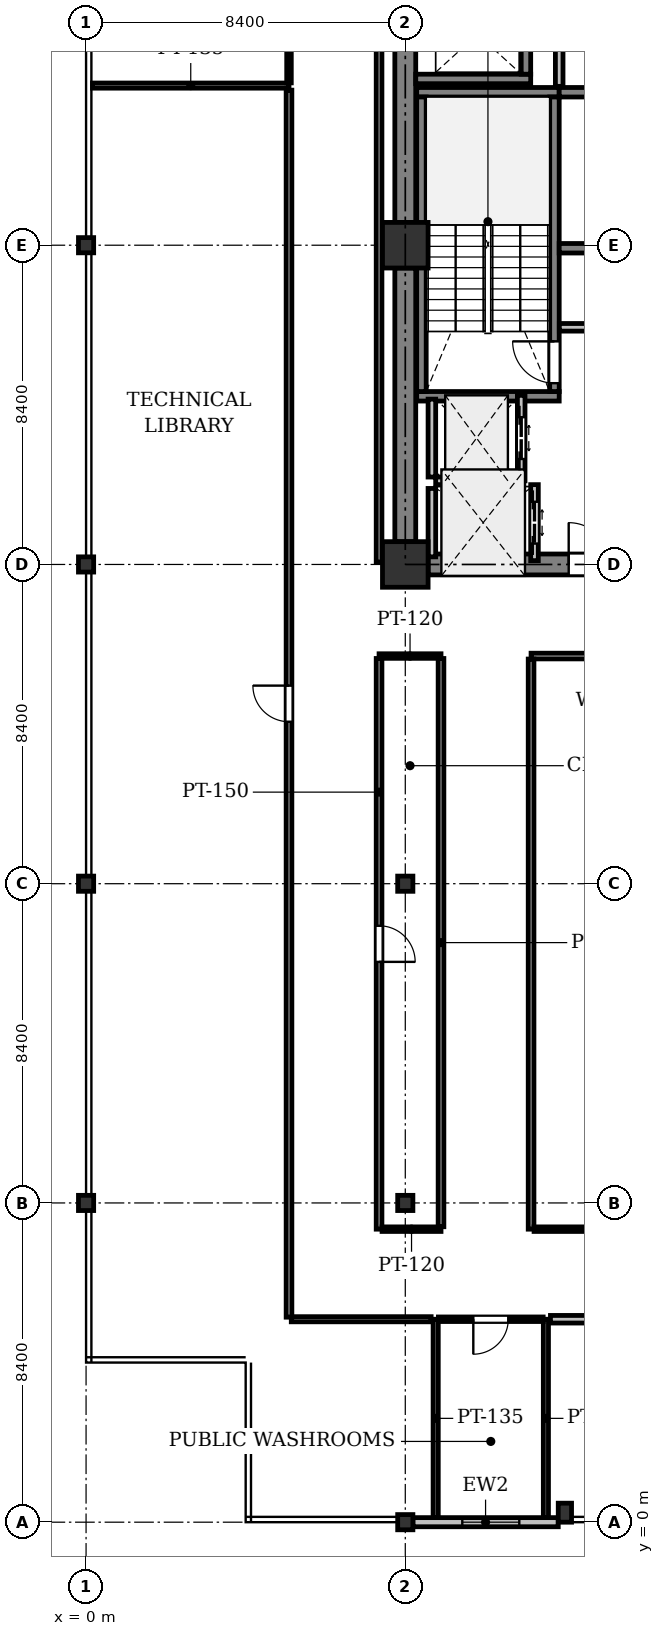
"""IFC4 building model, lengths in metres.
Left out: names, types, materials, properties, quantities, classifications, styles, units other than length and angle.
Written with IfcOpenShell. Run it as: python <this file> out.ifc"""

import sys

from ifc_helpers import new_model, si_unit, direction, frame, frame_2d, origin, origin_2d, place, context, subcontext, project, spatial, rectangle, i_section, extrude, element, fill, save


model = new_model("IFC4")
c1 = context("Model", 3, precision=1e-05, world=origin(), true_north=direction((0.0, 1.0)))
c2 = subcontext(c1, "Body", "Model", "MODEL_VIEW")
j1 = project(units=[si_unit("LENGTHUNIT", "METRE"), si_unit("PLANEANGLEUNIT", "RADIAN")], contexts=[c1])
p1 = place(None, origin())
s1 = spatial("IfcSite", under=j1, at=p1, CompositionType="ELEMENT")
p2 = place(p1, origin())
s2 = spatial("IfcBuilding", under=s1, at=p2, CompositionType="ELEMENT")
p3 = place(p2, frame((0.0, 0.0, 154.1)))
s3 = spatial("IfcBuildingStorey", under=s2, at=p3, CompositionType="ELEMENT", Elevation=154.1)
for number, where, z_axis, x_axis in (
    (1, (0.0, 8.4, 0.0), (0.0, 0.0, 1.0), (1.0, 0.0, 0.0)),
    (2, (0.0, 16.8, 0.0), (0.0, 0.0, 1.0), (1.0, 0.0, 0.0)),
    (3, (0.0, 25.2, 0.0), (0.0, 0.0, 1.0), (1.0, 0.0, 0.0)),
    (4, (0.0, 33.6, 0.0), (0.0, 0.0, 1.0), (1.0, 0.0, 0.0)),
    (5, (8.4, 0.0, 0.0), (0.0, 0.0, 1.0), (1.0, 0.0, 0.0)),
    (6, (8.4, 8.4, 0.0), (0.0, 0.0, 1.0), (1.0, 0.0, 0.0)),
    (7, (8.4, 16.8, 0.0), (0.0, 0.0, 1.0), (1.0, 0.0, 0.0)),
):
    element("IfcColumn", number, at=place(p3, frame(where, z_axis=z_axis, x_axis=x_axis)), inside=s3, PredefinedType="COLUMN", context=c2, shape_type="SweptSolid", body=[
        extrude(i_section(OverallWidth=0.4, OverallDepth=0.4, WebThickness=0.025, FlangeThickness=0.04, at=origin_2d()), origin(), (0.0, 0.0, 1.0), 4.1),
    ])
for number, where, z_axis, x_axis in (
    (8, (8.4, 25.2, 0.0), (0.0, 0.0, 1.0), (1.0, 0.0, 0.0)),
    (9, (8.4, 33.6, 0.0), (0.0, 0.0, 1.0), (1.0, 0.0, 0.0)),
):
    element("IfcColumn", number, at=place(p3, frame(where, z_axis=z_axis, x_axis=x_axis)), inside=s3, PredefinedType="COLUMN", context=c2, shape_type="SweptSolid", body=[
        extrude(rectangle(XDim=1.2, YDim=1.2, at=origin_2d()), origin(), (0.0, 0.0, 1.0), 4.1),
    ])
p4 = place(p3, frame((12.6, 0.25, 0.0), z_axis=(0.0, 0.0, 1.0), x_axis=(1.0, 0.0, 0.0)))
e10 = element("IfcColumn", 10, at=p4, inside=s3, PredefinedType="PILASTER", context=c2, shape_type="SweptSolid", body=[
    extrude(rectangle(XDim=0.35, YDim=0.5, at=origin_2d()), origin(), (0.0, 0.0, 1.0), 4.1),
])
p5 = place(p3, frame((12.425, 0.0, 0.0), z_axis=(0.0, 0.0, 1.0), x_axis=(-1.0, 0.0, 0.0)))
e11 = element("IfcWall", 11, at=p5, inside=s3, PredefinedType="STANDARD", context=c2, shape_type="SweptSolid", body=[
    extrude(rectangle(XDim=3.825, YDim=0.24, at=frame_2d((1.913, 0.0))), origin(), (0.0, 0.0, 1.0), 3.422),
])
p6 = place(p5, frame((1.025, 0.0, 0.9)))
e12 = element("IfcOpeningElement", 12, at=p6, cuts=e11, PredefinedType="OPENING", context=c2, shape_type="SweptSolid", body=[
    extrude(rectangle(XDim=1.5, YDim=1.6, at=frame_2d((0.75, 0.8))), frame((0.0, 0.13, 0.0), z_axis=(0.0, -1.0, 0.0), x_axis=(1.0, 0.0, 0.0)), (0.0, 0.0, 1.0), 0.26),
])
for number, where, z_axis, x_axis in (
    (13, (8.4, 25.8, 0.0), (0.0, 0.0, 1.0), (0.0, 1.0, 0.0)),
    (14, (8.4, 34.2, 0.0), (0.0, 0.0, 1.0), (0.0, 1.0, 0.0)),
):
    element("IfcWall", number, at=place(p3, frame(where, z_axis=z_axis, x_axis=x_axis)), inside=s3, PredefinedType="SHEAR", context=c2, shape_type="SweptSolid", body=[
        extrude(rectangle(XDim=7.2, YDim=0.55, at=frame_2d((3.6, 0.0))), origin(), (0.0, 0.0, 1.0), 3.825),
    ])
p7 = place(p3, frame((9.0, 25.2, 0.0), z_axis=(0.0, 0.0, 1.0), x_axis=(1.0, 0.0, 0.0)))
e15 = element("IfcWall", 15, at=p7, inside=s3, PredefinedType="SHEAR", context=c2, shape_type="SweptSolid", body=[
    extrude(rectangle(XDim=7.2, YDim=0.55, at=frame_2d((3.6, 0.0))), origin(), (0.0, 0.0, 1.0), 3.825),
])
p8 = place(p7, frame((3.7, 0.0, 0.0)))
e16 = element("IfcOpeningElement", 16, at=p8, cuts=e15, PredefinedType="OPENING", context=c2, shape_type="SweptSolid", body=[
    extrude(rectangle(XDim=1.1, YDim=2.15, at=frame_2d((0.55, 1.075))), frame((0.0, 0.285, 0.0), z_axis=(0.0, -1.0, 0.0), x_axis=(1.0, 0.0, 0.0)), (0.0, 0.0, 1.0), 0.57),
])
for number, where, z_axis, x_axis in (
    (17, (12.45, 29.625, 0.0), (0.0, 0.0, 1.0), (-1.0, 0.0, 0.0)),
    (18, (12.45, 37.625, 0.0), (0.0, 0.0, 1.0), (-1.0, 0.0, 0.0)),
):
    element("IfcWall", number, at=place(p3, frame(where, z_axis=z_axis, x_axis=x_axis)), inside=s3, PredefinedType="SHEAR", context=c2, shape_type="SweptSolid", body=[
        extrude(rectangle(XDim=3.75, YDim=0.25, at=frame_2d((1.875, 0.0))), origin(), (0.0, 0.0, 1.0), 3.825),
    ])
p9 = place(p3, frame((12.325, 29.75, 0.0), z_axis=(0.0, 0.0, 1.0), x_axis=(0.0, 1.0, 0.0)))
e19 = element("IfcWall", 19, at=p9, inside=s3, PredefinedType="SHEAR", context=c2, shape_type="SweptSolid", body=[
    extrude(rectangle(XDim=7.75, YDim=0.25, at=frame_2d((3.875, 0.0))), origin(), (0.0, 0.0, 1.0), 3.825),
])
p10 = place(p9, frame((0.22, 0.0, 0.0)))
e20 = element("IfcOpeningElement", 20, at=p10, cuts=e19, PredefinedType="OPENING", context=c2, shape_type="SweptSolid", body=[
    extrude(rectangle(XDim=1.1, YDim=2.15, at=frame_2d((0.55, 1.075))), frame((0.0, 0.135, 0.0), z_axis=(0.0, -1.0, 0.0), x_axis=(1.0, 0.0, 0.0)), (0.0, 0.0, 1.0), 0.27),
])
p11 = place(p3, frame((8.825, 29.75, 0.0), z_axis=(0.0, 0.0, 1.0), x_axis=(0.0, 1.0, 0.0)))
e21 = element("IfcWall", 21, at=p11, inside=s3, PredefinedType="SHEAR", context=c2, shape_type="SweptSolid", body=[
    extrude(rectangle(XDim=7.75, YDim=0.25, at=frame_2d((3.875, 0.0))), origin(), (0.0, 0.0, 1.0), 3.825),
])
p12 = place(p3, frame((8.675, 37.975, 0.0), z_axis=(0.0, 0.0, 1.0), x_axis=(1.0, 0.0, 0.0)))
e22 = element("IfcWall", 22, at=p12, inside=s3, PredefinedType="SHEAR", context=c2, shape_type="SweptSolid", body=[
    extrude(rectangle(XDim=3.025, YDim=0.25, at=frame_2d((1.512, 0.0))), origin(), (0.0, 0.0, 1.0), 3.825),
])
p13 = place(p3, frame((11.575, 38.1, 0.0), z_axis=(0.0, 0.0, 1.0), x_axis=(0.0, 1.0, 0.0)))
e23 = element("IfcWall", 23, at=p13, inside=s3, PredefinedType="SHEAR", context=c2, shape_type="SweptSolid", body=[
    extrude(rectangle(XDim=2.55, YDim=0.25, at=frame_2d((1.275, 0.0))), origin(), (0.0, 0.0, 1.0), 3.825),
])
p14 = place(p3, frame((12.45, 33.52, 0.0), z_axis=(0.0, 0.0, 1.0), x_axis=(1.0, 0.0, 0.0)))
e24 = element("IfcWall", 24, at=p14, inside=s3, PredefinedType="SHEAR", context=c2, shape_type="SweptSolid", body=[
    extrude(rectangle(XDim=3.75, YDim=0.25, at=frame_2d((1.875, 0.0))), origin(), (0.0, 0.0, 1.0), 3.825),
])
p15 = place(p14, frame((2.15, 0.0, 0.0)))
e25 = element("IfcOpeningElement", 25, at=p15, cuts=e24, PredefinedType="OPENING", context=c2, shape_type="SweptSolid", body=[
    extrude(rectangle(XDim=1.0, YDim=2.15, at=frame_2d((0.5, 1.075))), frame((0.0, 0.135, 0.0), z_axis=(0.0, -1.0, 0.0), x_axis=(1.0, 0.0, 0.0)), (0.0, 0.0, 1.0), 0.27),
])
p16 = place(p3, frame((12.45, 37.625, 0.0), z_axis=(0.0, 0.0, 1.0), x_axis=(1.0, 0.0, 0.0)))
e26 = element("IfcWall", 26, at=p16, inside=s3, PredefinedType="SHEAR", context=c2, shape_type="SweptSolid", body=[
    extrude(rectangle(XDim=4.075, YDim=0.25, at=frame_2d((2.038, 0.0))), origin(), (0.0, 0.0, 1.0), 3.825),
])
p17 = place(p16, frame((1.613, 0.0, 0.0)))
e27 = element("IfcOpeningElement", 27, at=p17, cuts=e26, PredefinedType="OPENING", context=c2, shape_type="SweptSolid", body=[
    extrude(rectangle(XDim=0.85, YDim=2.15, at=frame_2d((0.425, 1.075))), frame((0.0, 0.135, 0.0), z_axis=(0.0, -1.0, 0.0), x_axis=(1.0, 0.0, 0.0)), (0.0, 0.0, 1.0), 0.27),
])
p18 = place(p3, frame((11.45, 27.4, 0.0), z_axis=(0.0, 0.0, 1.0), x_axis=(0.0, 1.0, 0.0)))
e28 = element("IfcWall", 28, at=p18, inside=s3, PredefinedType="PARTITIONING", context=c2, shape_type="SweptSolid", body=[
    extrude(rectangle(XDim=2.25, YDim=0.2, at=frame_2d((1.125, 0.0))), origin(), (0.0, 0.0, 1.0), 3.825),
])
p19 = place(p18, frame((0.575, 0.0, 0.0)))
e29 = element("IfcOpeningElement", 29, at=p19, cuts=e28, PredefinedType="OPENING", context=c2, shape_type="SweptSolid", body=[
    extrude(rectangle(XDim=1.1, YDim=2.2, at=frame_2d((0.55, 1.1))), frame((0.0, 0.11, 0.0), z_axis=(0.0, -1.0, 0.0), x_axis=(1.0, 0.0, 0.0)), (0.0, 0.0, 1.0), 0.22),
])
p20 = place(p3, frame((9.1, 27.5, 0.0), z_axis=(0.0, 0.0, 1.0), x_axis=(0.0, 1.0, 0.0)))
e30 = element("IfcWall", 30, at=p20, inside=s3, PredefinedType="PARTITIONING", context=c2, shape_type="SweptSolid", body=[
    extrude(rectangle(XDim=2.05, YDim=0.2, at=frame_2d((1.025, 0.0))), origin(), (0.0, 0.0, 1.0), 3.825),
])
p21 = place(p3, frame((9.2, 27.4, 0.0), z_axis=(0.0, 0.0, 1.0), x_axis=(1.0, 0.0, 0.0)))
e31 = element("IfcWall", 31, at=p21, inside=s3, PredefinedType="PARTITIONING", context=c2, shape_type="SweptSolid", body=[
    extrude(rectangle(XDim=2.15, YDim=0.2, at=frame_2d((1.075, 0.0))), origin(), (0.0, 0.0, 1.0), 3.825),
])
p22 = place(p3, frame((11.8, 25.3, 0.0), z_axis=(0.0, 0.0, 1.0), x_axis=(0.0, 1.0, 0.0)))
e32 = element("IfcWall", 32, at=p22, inside=s3, PredefinedType="PARTITIONING", context=c2, shape_type="SweptSolid", body=[
    extrude(rectangle(XDim=2.0, YDim=0.2, at=frame_2d((1.0, 0.0))), origin(), (0.0, 0.0, 1.0), 3.825),
])
p23 = place(p22, frame((0.45, 0.0, 0.0)))
e33 = element("IfcOpeningElement", 33, at=p23, cuts=e32, PredefinedType="OPENING", context=c2, shape_type="SweptSolid", body=[
    extrude(rectangle(XDim=1.1, YDim=2.2, at=frame_2d((0.55, 1.1))), frame((0.0, 0.11, 0.0), z_axis=(0.0, -1.0, 0.0), x_axis=(1.0, 0.0, 0.0)), (0.0, 0.0, 1.0), 0.22),
])
p24 = place(p3, frame((9.1, 25.4, 0.0), z_axis=(0.0, 0.0, 1.0), x_axis=(0.0, 1.0, 0.0)))
e34 = element("IfcWall", 34, at=p24, inside=s3, PredefinedType="PARTITIONING", context=c2, shape_type="SweptSolid", body=[
    extrude(rectangle(XDim=1.8, YDim=0.2, at=frame_2d((0.9, 0.0))), origin(), (0.0, 0.0, 1.0), 3.825),
])
p25 = place(p3, frame((12.454, 31.44, 0.0), z_axis=(0.0, 0.0, 1.0), x_axis=(1.0, 0.0, 0.0)))
e35 = element("IfcWall", 35, at=p25, inside=s3, PredefinedType="PARTITIONING", context=c2, shape_type="SweptSolid", body=[
    extrude(rectangle(XDim=1.666, YDim=0.2, at=frame_2d((0.833, 0.0))), origin(), (0.0, 0.0, 1.0), 3.825),
])
p26 = place(p3, frame((12.45, 40.646, 0.0), z_axis=(0.0, 0.0, 1.0), x_axis=(0.0, -1.0, 0.0)))
e36 = element("IfcWall", 36, at=p26, inside=s3, PredefinedType="PARTITIONING", context=c2, shape_type="SweptSolid", body=[
    extrude(rectangle(XDim=2.866, YDim=0.2, at=frame_2d((1.433, 0.0))), origin(), (0.0, 0.0, 1.0), 2.725),
])
p27 = place(p3, frame((0.169, 37.8, 0.0), z_axis=(0.0, 0.0, 1.0), x_axis=(1.0, 0.0, 0.0)))
e37 = element("IfcWall", 37, at=p27, inside=s3, PredefinedType="PARTITIONING", context=c2, shape_type="SweptSolid", body=[
    extrude(rectangle(XDim=5.171, YDim=0.135, at=frame_2d((2.585, 0.0))), origin(), (0.0, 0.0, 1.0), 3.469),
])
p28 = place(p3, frame((5.34, 37.872, 0.0), z_axis=(0.0, 0.0, 1.0), x_axis=(0.0, 1.0, 0.0)))
e38 = element("IfcWall", 38, at=p28, inside=s3, PredefinedType="PARTITIONING", context=c2, shape_type="SweptSolid", body=[
    extrude(rectangle(XDim=2.907, YDim=0.12, at=frame_2d((1.454, 0.0))), origin(), (0.0, 0.0, 1.0), 3.825),
])
p29 = place(p28, frame((0.993, 0.0, 0.0)))
e39 = element("IfcOpeningElement", 39, at=p29, cuts=e38, PredefinedType="OPENING", context=c2, shape_type="SweptSolid", body=[
    extrude(rectangle(XDim=0.92, YDim=2.1, at=frame_2d((0.46, 1.05))), frame((0.0, 0.07, 0.0), z_axis=(0.0, -1.0, 0.0), x_axis=(1.0, 0.0, 0.0)), (0.0, 0.0, 1.0), 0.14),
])
for number, where, z_axis, x_axis in (
    (40, (9.2, 5.34, 0.0), (0.0, 0.0, 1.0), (0.0, -1.0, 0.0)),
    (41, (12.1, 0.124, 0.0), (0.0, 0.0, 1.0), (0.0, 1.0, 0.0)),
):
    element("IfcWall", number, at=place(p3, frame(where, z_axis=z_axis, x_axis=x_axis)), inside=s3, PredefinedType="PARTITIONING", context=c2, shape_type="SweptSolid", body=[
        extrude(rectangle(XDim=5.216, YDim=0.135, at=frame_2d((2.608, 0.0))), origin(), (0.0, 0.0, 1.0), 3.825),
    ])
p30 = place(p3, frame((12.029, 5.34, 0.0), z_axis=(0.0, 0.0, 1.0), x_axis=(-1.0, 0.0, 0.0)))
e42 = element("IfcWall", 42, at=p30, inside=s3, PredefinedType="PARTITIONING", context=c2, shape_type="SweptSolid", body=[
    extrude(rectangle(XDim=2.757, YDim=0.12, at=frame_2d((1.378, 0.0))), origin(), (0.0, 0.0, 1.0), 3.825),
])
p31 = place(p30, frame((0.918, 0.0, 0.0)))
e43 = element("IfcOpeningElement", 43, at=p31, cuts=e42, PredefinedType="OPENING", context=c2, shape_type="SweptSolid", body=[
    extrude(rectangle(XDim=0.92, YDim=2.1, at=frame_2d((0.46, 1.05))), frame((0.0, 0.07, 0.0), z_axis=(0.0, -1.0, 0.0), x_axis=(1.0, 0.0, 0.0)), (0.0, 0.0, 1.0), 0.14),
])
p32 = place(p3, frame((9.34, 22.79, 0.0), z_axis=(0.0, 0.0, 1.0), x_axis=(-1.0, 0.0, 0.0)))
e44 = element("IfcWall", 44, at=p32, inside=s3, PredefinedType="PARTITIONING", context=c2, shape_type="SweptSolid", body=[
    extrude(rectangle(XDim=1.63, YDim=0.12, at=frame_2d((0.815, 0.0))), origin(), (0.0, 0.0, 1.0), 3.297),
])
p33 = place(p3, frame((7.71, 22.726, 0.0), z_axis=(0.0, 0.0, 1.0), x_axis=(0.0, -1.0, 0.0)))
e45 = element("IfcWall", 45, at=p33, inside=s3, PredefinedType="PARTITIONING", context=c2, shape_type="SweptSolid", body=[
    extrude(rectangle(XDim=15.016, YDim=0.15, at=frame_2d((7.508, 0.0))), origin(), (0.0, 0.0, 1.0), 3.292),
])
p34 = place(p33, frame((7.033, 0.0, 0.0)))
e46 = element("IfcOpeningElement", 46, at=p34, cuts=e45, PredefinedType="OPENING", context=c2, shape_type="SweptSolid", body=[
    extrude(rectangle(XDim=0.95, YDim=2.15, at=frame_2d((0.475, 1.075))), frame((0.0, 0.085, 0.0), z_axis=(0.0, -1.0, 0.0), x_axis=(1.0, 0.0, 0.0)), (0.0, 0.0, 1.0), 0.17),
])
p35 = place(p3, frame((7.789, 7.71, 0.0), z_axis=(0.0, 0.0, 1.0), x_axis=(1.0, 0.0, 0.0)))
e47 = element("IfcWall", 47, at=p35, inside=s3, PredefinedType="PARTITIONING", context=c2, shape_type="SweptSolid", body=[
    extrude(rectangle(XDim=1.551, YDim=0.12, at=frame_2d((0.775, 0.0))), origin(), (0.0, 0.0, 1.0), 3.297),
])
p36 = place(p3, frame((9.34, 7.774, 0.0), z_axis=(0.0, 0.0, 1.0), x_axis=(0.0, 1.0, 0.0)))
e48 = element("IfcWall", 48, at=p36, inside=s3, PredefinedType="PARTITIONING", context=c2, shape_type="SweptSolid", body=[
    extrude(rectangle(XDim=14.952, YDim=0.15, at=frame_2d((7.476, 0.0))), origin(), (0.0, 0.0, 1.0), 3.292),
])
p37 = place(p3, frame((34.261, 22.79, 0.0), z_axis=(0.0, 0.0, 1.0), x_axis=(-1.0, 0.0, 0.0)))
e49 = element("IfcWall", 49, at=p37, inside=s3, PredefinedType="PARTITIONING", context=c2, shape_type="SweptSolid", body=[
    extrude(rectangle(XDim=22.551, YDim=0.15, at=frame_2d((11.275, 0.0))), origin(), (0.0, 0.0, 1.0), 3.297),
])
p38 = place(p37, frame((10.801, 0.0, 0.0)))
e50 = element("IfcOpeningElement", 50, at=p38, cuts=e49, PredefinedType="OPENING", context=c2, shape_type="SweptSolid", body=[
    extrude(rectangle(XDim=0.95, YDim=2.15, at=frame_2d((0.475, 1.075))), frame((0.0, 0.085, 0.0), z_axis=(0.0, -1.0, 0.0), x_axis=(1.0, 0.0, 0.0)), (0.0, 0.0, 1.0), 0.17),
])
p39 = place(p3, frame((11.71, 22.711, 0.0), z_axis=(0.0, 0.0, 1.0), x_axis=(0.0, -1.0, 0.0)))
e51 = element("IfcWall", 51, at=p39, inside=s3, PredefinedType="PARTITIONING", context=c2, shape_type="SweptSolid", body=[
    extrude(rectangle(XDim=15.001, YDim=0.15, at=frame_2d((7.5, 0.0))), origin(), (0.0, 0.0, 1.0), 3.292),
])
p40 = place(p3, frame((11.789, 7.71, 0.0), z_axis=(0.0, 0.0, 1.0), x_axis=(1.0, 0.0, 0.0)))
e52 = element("IfcWall", 52, at=p40, inside=s3, PredefinedType="PARTITIONING", context=c2, shape_type="SweptSolid", body=[
    extrude(rectangle(XDim=2.551, YDim=0.12, at=frame_2d((1.275, 0.0))), origin(), (0.0, 0.0, 1.0), 3.469),
])
p41 = place(p3, frame((9.08, 5.34, 0.0), z_axis=(0.0, 0.0, 1.0), x_axis=(-1.0, 0.0, 0.0)))
e53 = element("IfcWall", 53, at=p41, inside=s3, PredefinedType="PARTITIONING", context=c2, shape_type="SweptSolid", body=[
    extrude(rectangle(XDim=3.68, YDim=0.135, at=frame_2d((1.84, 0.0))), origin(), (0.0, 0.0, 1.0), 3.297),
])
p42 = place(p3, frame((5.34, 5.394, 0.0), z_axis=(0.0, 0.0, 1.0), x_axis=(-7.561837e-06, 0.999999999971, 0.0)))
e54 = element("IfcWall", 54, at=p42, inside=s3, PredefinedType="PARTITIONING", context=c2, shape_type="SweptSolid", body=[
    extrude(rectangle(XDim=32.286, YDim=0.15, at=frame_2d((16.143, 0.0))), origin(), (0.0, 0.0, 1.0), 3.292),
])
p43 = place(p42, frame((15.668, 0.0, 0.0)))
e55 = element("IfcOpeningElement", 55, at=p43, cuts=e54, PredefinedType="OPENING", context=c2, shape_type="SweptSolid", body=[
    extrude(rectangle(XDim=0.95, YDim=2.15, at=frame_2d((0.475, 1.075))), frame((0.0, 0.085, 0.0), z_axis=(0.0, -1.0, 0.0), x_axis=(1.0, 0.0, 0.0)), (0.0, 0.0, 1.0), 0.17),
])
p44 = place(p3, frame((7.71, 43.0, 0.0), z_axis=(0.0, 0.0, 1.0), x_axis=(0.0, -1.0, 0.0)))
e56 = element("IfcWall", 56, at=p44, inside=s3, PredefinedType="PARTITIONING", context=c2, shape_type="SweptSolid", body=[
    extrude(rectangle(XDim=17.74, YDim=0.15, at=frame_2d((8.87, 0.0))), origin(), (0.0, 0.0, 1.0), 3.292),
])
p45 = place(p3, frame((36.65, 5.34, 0.0), z_axis=(0.0, 0.0, 1.0), x_axis=(-1.0, 0.0, 0.0)))
e57 = element("IfcWall", 57, at=p45, inside=s3, PredefinedType="PARTITIONING", context=c2, shape_type="SweptSolid", body=[
    extrude(rectangle(XDim=24.43, YDim=0.2, at=frame_2d((12.215, 0.0))), origin(), (0.0, 0.0, 1.0), 3.297),
])
p46 = place(p45, frame((11.715, 0.0, 0.0)))
e58 = element("IfcOpeningElement", 58, at=p46, cuts=e57, PredefinedType="OPENING", context=c2, shape_type="SweptSolid", body=[
    extrude(rectangle(XDim=1.0, YDim=2.15, at=frame_2d((0.5, 1.075))), frame((0.0, 0.11, 0.0), z_axis=(0.0, -1.0, 0.0), x_axis=(1.0, 0.0, 0.0)), (0.0, 0.0, 1.0), 0.22),
])
p47 = place(p6, origin())
e59 = element("IfcWindow", 59, at=p47, inside=s3, PartitioningType="SINGLE_PANEL", PredefinedType="WINDOW", context=c2, shape_type="SweptSolid", body=[
    extrude(rectangle(XDim=1.5, YDim=1.6, at=frame_2d((0.75, 0.8))), frame((0.0, 0.03, 0.0), z_axis=(0.0, -1.0, 0.0), x_axis=(1.0, 0.0, 0.0)), (0.0, 0.0, 1.0), 0.06),
])
fill(e12, e59)
p48 = place(p8, origin())
e60 = element("IfcDoor", 60, at=p48, inside=s3, OperationType="SINGLE_SWING_LEFT", PredefinedType="DOOR", context=c2, shape_type="SweptSolid", body=[
    extrude(rectangle(XDim=1.1, YDim=2.15, at=frame_2d((0.55, 1.075))), frame((0.0, 0.025, 0.0), z_axis=(0.0, -1.0, 0.0), x_axis=(1.0, 0.0, 0.0)), (0.0, 0.0, 1.0), 0.05),
])
fill(e16, e60)
p49 = place(p10, origin())
e61 = element("IfcDoor", 61, at=p49, inside=s3, OperationType="SINGLE_SWING_RIGHT", PredefinedType="DOOR", context=c2, shape_type="SweptSolid", body=[
    extrude(rectangle(XDim=1.1, YDim=2.15, at=frame_2d((0.55, 1.075))), frame((0.0, 0.025, 0.0), z_axis=(0.0, -1.0, 0.0), x_axis=(1.0, 0.0, 0.0)), (0.0, 0.0, 1.0), 0.05),
])
fill(e20, e61)
p50 = place(p19, origin())
e62 = element("IfcDoor", 62, at=p50, inside=s3, OperationType="DOUBLE_DOOR_SLIDING", PredefinedType="DOOR", context=c2, shape_type="SweptSolid", body=[
    extrude(rectangle(XDim=1.1, YDim=2.2, at=frame_2d((0.55, 1.1))), frame((0.0, 0.025, 0.0), z_axis=(0.0, -1.0, 0.0), x_axis=(1.0, 0.0, 0.0)), (0.0, 0.0, 1.0), 0.05),
])
fill(e29, e62)
p51 = place(p23, origin())
e63 = element("IfcDoor", 63, at=p51, inside=s3, OperationType="DOUBLE_DOOR_SLIDING", PredefinedType="DOOR", context=c2, shape_type="SweptSolid", body=[
    extrude(rectangle(XDim=1.1, YDim=2.2, at=frame_2d((0.55, 1.1))), frame((0.0, 0.025, 0.0), z_axis=(0.0, -1.0, 0.0), x_axis=(1.0, 0.0, 0.0)), (0.0, 0.0, 1.0), 0.05),
])
fill(e33, e63)
p52 = place(p31, origin())
e64 = element("IfcDoor", 64, at=p52, inside=s3, OperationType="SINGLE_SWING_RIGHT", PredefinedType="DOOR", context=c2, shape_type="SweptSolid", body=[
    extrude(rectangle(XDim=0.92, YDim=2.1, at=frame_2d((0.46, 1.05))), frame((0.0, 0.025, 0.0), z_axis=(0.0, -1.0, 0.0), x_axis=(1.0, 0.0, 0.0)), (0.0, 0.0, 1.0), 0.05),
])
fill(e43, e64)
p53 = place(p34, origin())
e65 = element("IfcDoor", 65, at=p53, inside=s3, OperationType="SINGLE_SWING_RIGHT", PredefinedType="DOOR", context=c2, shape_type="SweptSolid", body=[
    extrude(rectangle(XDim=0.95, YDim=2.15, at=frame_2d((0.475, 1.075))), frame((0.0, 0.025, 0.0), z_axis=(0.0, -1.0, 0.0), x_axis=(1.0, 0.0, 0.0)), (0.0, 0.0, 1.0), 0.05),
])
fill(e46, e65)
p54 = place(p43, origin())
e66 = element("IfcDoor", 66, at=p54, inside=s3, OperationType="SINGLE_SWING_RIGHT", PredefinedType="DOOR", context=c2, shape_type="SweptSolid", body=[
    extrude(rectangle(XDim=0.95, YDim=2.15, at=frame_2d((0.475, 1.075))), frame((0.0, 0.025, 0.0), z_axis=(0.0, -1.0, 0.0), x_axis=(1.0, 0.0, 0.0)), (0.0, 0.0, 1.0), 0.05),
])
fill(e55, e66)
save(model, sys.argv[1])
